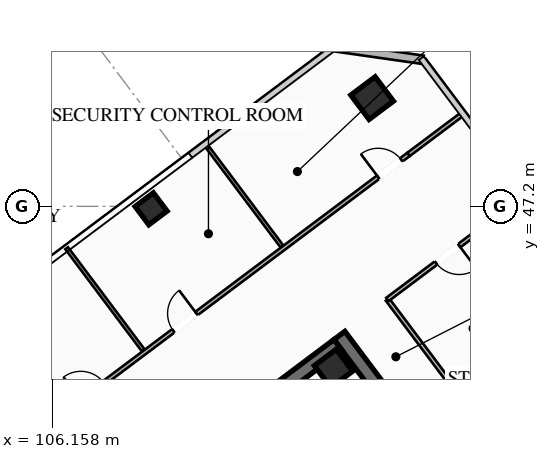
"""IFC4 building model, lengths in metres.
Left out: names, types, materials, properties, quantities, classifications, styles, units other than length and angle.
Written with IfcOpenShell. Run it as: python <this file> out.ifc"""

import sys

from ifc_helpers import new_model, si_unit, direction, frame, frame_2d, origin, origin_2d, place, context, subcontext, project, spatial, rectangle, hollow_rectangle, extrude, element, fill, save


model = new_model("IFC4")
c1 = context("Model", 3, precision=1e-05, world=origin(), true_north=direction((0.0, 1.0)))
c2 = subcontext(c1, "Body", "Model", "MODEL_VIEW")
j1 = project(units=[si_unit("LENGTHUNIT", "METRE"), si_unit("PLANEANGLEUNIT", "RADIAN")], contexts=[c1])
p1 = place(None, origin())
s1 = spatial("IfcSite", under=j1, at=p1, CompositionType="ELEMENT")
p2 = place(p1, origin())
s2 = spatial("IfcBuilding", under=s1, at=p2, CompositionType="ELEMENT")
p3 = place(p2, frame((0.0, 0.0, 221.95)))
s3 = spatial("IfcBuildingStorey", under=s2, at=p3, CompositionType="ELEMENT", Elevation=221.95)
p4 = place(p3, frame((115.604, 42.953, 0.0), z_axis=(0.0, 0.0, 1.0), x_axis=(0.600005007985, -0.799996243986, 0.0)))
e1 = element("IfcWall", 1, at=p4, inside=s3, PredefinedType="SHEAR", context=c2, shape_type="SweptSolid", body=[
    extrude(rectangle(XDim=15.6, YDim=0.45, at=frame_2d((7.8, 0.0))), origin(), (0.0, 0.0, 1.0), 3.55),
])
p5 = place(p3, frame((103.351, 33.482, 0.0), z_axis=(0.0, 0.0, 1.0), x_axis=(0.8, 0.6, 0.0)))
e2 = element("IfcWall", 2, at=p5, inside=s3, PredefinedType="SHEAR", context=c2, shape_type="SweptSolid", body=[
    extrude(rectangle(XDim=15.26, YDim=0.45, at=frame_2d((7.63, 0.0))), origin(), (0.0, 0.0, 1.0), 3.55),
])
p6 = place(p5, frame((4.68, 0.0, 0.0)))
e3 = element("IfcOpeningElement", 3, at=p6, cuts=e2, PredefinedType="OPENING", context=c2, shape_type="SweptSolid", body=[
    extrude(rectangle(XDim=1.25, YDim=2.25, at=frame_2d((0.625, 1.125))), frame((0.0, 0.235, 0.0), z_axis=(0.0, -1.0, 0.0), x_axis=(1.0, 0.0, 0.0)), (0.0, 0.0, 1.0), 0.47),
])
p7 = place(p5, frame((9.73, 0.0, 0.0)))
e4 = element("IfcOpeningElement", 4, at=p7, cuts=e2, PredefinedType="OPENING", context=c2, shape_type="SweptSolid", body=[
    extrude(rectangle(XDim=1.25, YDim=2.25, at=frame_2d((0.625, 1.125))), frame((0.0, 0.235, 0.0), z_axis=(0.0, -1.0, 0.0), x_axis=(1.0, 0.0, 0.0)), (0.0, 0.0, 1.0), 0.47),
])
p8 = place(p3, frame((115.41, 41.87, 0.0), z_axis=(0.0, 0.0, 1.0), x_axis=(0.799999996291, 0.600000004945, 0.0)))
e5 = element("IfcColumn", 5, at=p8, inside=s3, PredefinedType="COLUMN", context=c2, shape_type="SweptSolid", body=[
    extrude(hollow_rectangle(XDim=0.9, YDim=0.9, WallThickness=0.04, at=origin_2d()), origin(), (0.0, 0.0, 1.0), 3.37),
])
p9 = place(p3, frame((116.68, 50.76, 0.0), z_axis=(0.0, 0.0, 1.0), x_axis=(0.799999996291, 0.600000004945, 0.0)))
e6 = element("IfcColumn", 6, at=p9, inside=s3, PredefinedType="COLUMN", context=c2, shape_type="SweptSolid", body=[
    extrude(hollow_rectangle(XDim=1.0, YDim=1.0, WallThickness=0.04, at=origin_2d()), origin(), (0.0, 0.0, 1.0), 3.37),
])
p10 = place(p3, frame((109.41, 47.12, 0.0), z_axis=(0.0, 0.0, 1.0), x_axis=(0.799999996291, 0.600000004945, 0.0)))
e7 = element("IfcColumn", 7, at=p10, inside=s3, PredefinedType="COLUMN", context=c2, shape_type="SweptSolid", body=[
    extrude(hollow_rectangle(XDim=0.75, YDim=0.75, WallThickness=0.032, at=origin_2d()), origin(), (0.0, 0.0, 1.0), 3.37),
])
p11 = place(p3, frame((115.42, 52.44, 0.0), z_axis=(0.0, 0.0, 1.0), x_axis=(0.989954425158, -0.14138683146, 0.0)))
e8 = element("IfcWall", 8, at=p11, inside=s3, PredefinedType="SOLIDWALL", context=c2, shape_type="SweptSolid", body=[
    extrude(rectangle(XDim=2.97, YDim=0.28, at=frame_2d((1.485, 0.0))), origin(), (0.0, 0.0, 1.0), 3.37),
])
p12 = place(p3, frame((121.204, 41.528, 0.0), z_axis=(0.0, 0.0, 1.0), x_axis=(-0.800017232136, -0.599977023131, 0.0)))
e9 = element("IfcWall", 9, at=p12, inside=s3, PredefinedType="SHEAR", context=c2, shape_type="SweptSolid", body=[
    extrude(rectangle(XDim=3.4, YDim=0.2, at=frame_2d((1.7, 0.0))), origin(), (0.0, 0.0, 1.0), 3.37),
])
p13 = place(p12, frame((1.975, 0.0, 0.0)))
e10 = element("IfcOpeningElement", 10, at=p13, cuts=e9, PredefinedType="OPENING", context=c2, shape_type="SweptSolid", body=[
    extrude(rectangle(XDim=1.15, YDim=2.2, at=frame_2d((0.575, 1.1))), frame((0.0, 0.11, 0.0), z_axis=(0.0, -1.0, 0.0), x_axis=(1.0, 0.0, 0.0)), (0.0, 0.0, 1.0), 0.22),
])
p14 = place(p3, frame((119.824, 40.618, 0.0), z_axis=(0.0, 0.0, 1.0), x_axis=(-0.599982243973, 0.800013316712, 0.0)))
e11 = element("IfcWall", 11, at=p14, inside=s3, PredefinedType="PARTITIONING", context=c2, shape_type="SweptSolid", body=[
    extrude(rectangle(XDim=4.4, YDim=0.135, at=frame_2d((2.2, 0.0))), origin(), (0.0, 0.0, 1.0), 2.723),
])
p15 = place(p3, frame((98.696, 34.522, 0.0), z_axis=(0.0, 0.0, 1.0), x_axis=(0.799998778269, 0.600001628972, 0.0)))
e12 = element("IfcWall", 12, at=p15, inside=s3, PredefinedType="PARTITIONING", context=c2, shape_type="SweptSolid", body=[
    extrude(rectangle(XDim=23.98, YDim=0.135, at=frame_2d((11.99, 0.0))), origin(), (0.0, 0.0, 1.0), 2.723),
])
p16 = place(p15, frame((0.3, 0.0, 0.0)))
e13 = element("IfcOpeningElement", 13, at=p16, cuts=e12, PredefinedType="OPENING", context=c2, shape_type="SweptSolid", body=[
    extrude(rectangle(XDim=0.95, YDim=2.05, at=frame_2d((0.475, 1.025))), frame((0.0, 0.077, 0.0), z_axis=(0.0, -1.0, 0.0), x_axis=(1.0, 0.0, 0.0)), (0.0, 0.0, 1.0), 0.155),
])
p17 = place(p15, frame((10.503, 0.0, 0.0)))
e14 = element("IfcOpeningElement", 14, at=p17, cuts=e12, PredefinedType="OPENING", context=c2, shape_type="SweptSolid", body=[
    extrude(rectangle(XDim=0.95, YDim=2.05, at=frame_2d((0.475, 1.025))), frame((0.0, 0.077, 0.0), z_axis=(0.0, -1.0, 0.0), x_axis=(1.0, 0.0, 0.0)), (0.0, 0.0, 1.0), 0.155),
])
p18 = place(p15, frame((14.308, 0.0, 0.0)))
e15 = element("IfcOpeningElement", 15, at=p18, cuts=e12, PredefinedType="OPENING", context=c2, shape_type="SweptSolid", body=[
    extrude(rectangle(XDim=0.95, YDim=2.05, at=frame_2d((0.475, 1.025))), frame((0.0, 0.077, 0.0), z_axis=(0.0, -1.0, 0.0), x_axis=(1.0, 0.0, 0.0)), (0.0, 0.0, 1.0), 0.155),
])
p19 = place(p15, frame((22.73, 0.0, 0.0)))
e16 = element("IfcOpeningElement", 16, at=p19, cuts=e12, PredefinedType="OPENING", context=c2, shape_type="SweptSolid", body=[
    extrude(rectangle(XDim=0.95, YDim=2.05, at=frame_2d((0.475, 1.025))), frame((0.0, 0.077, 0.0), z_axis=(0.0, -1.0, 0.0), x_axis=(1.0, 0.0, 0.0)), (0.0, 0.0, 1.0), 0.155),
])
p20 = place(p3, frame((117.88, 48.91, 0.0), z_axis=(0.0, 0.0, 1.0), x_axis=(0.8, 0.6, 0.0)))
e17 = element("IfcWall", 17, at=p20, inside=s3, PredefinedType="PARTITIONING", context=c2, shape_type="SweptSolid", body=[
    extrude(rectangle(XDim=2.23, YDim=0.135, at=frame_2d((1.115, 0.0))), origin(), (0.0, 0.0, 1.0), 2.723),
])
for number, where, z_axis, x_axis in (
    (18, (109.152, 42.464, 0.0), (0.0, 0.0, 1.0), (-0.6, 0.8, 0.0)),
    (19, (113.712, 45.884, 0.0), (0.0, 0.0, 1.0), (-0.6, 0.8, 0.0)),
):
    element("IfcWall", number, at=place(p3, frame(where, z_axis=z_axis, x_axis=x_axis)), inside=s3, PredefinedType="PARTITIONING", context=c2, shape_type="SweptSolid", body=[
        extrude(rectangle(XDim=4.2, YDim=0.11, at=frame_2d((2.1, 0.0))), origin(), (0.0, 0.0, 1.0), 2.723),
    ])
p21 = place(p3, frame((121.704, 47.528, 0.0), z_axis=(0.0, 0.0, 1.0), x_axis=(-0.799989629485, -0.600013827105, 0.0)))
e20 = element("IfcWall", 20, at=p21, inside=s3, PredefinedType="PARTITIONING", context=c2, shape_type="SweptSolid", body=[
    extrude(rectangle(XDim=5.65, YDim=0.135, at=frame_2d((2.825, 0.0))), origin(), (0.0, 0.0, 1.0), 2.723),
])
p22 = place(p21, frame((2.7, 0.0, 0.0)))
e21 = element("IfcOpeningElement", 21, at=p22, cuts=e20, PredefinedType="OPENING", context=c2, shape_type="SweptSolid", body=[
    extrude(rectangle(XDim=0.95, YDim=2.05, at=frame_2d((0.475, 1.025))), frame((0.0, 0.077, 0.0), z_axis=(0.0, -1.0, 0.0), x_axis=(1.0, 0.0, 0.0)), (0.0, 0.0, 1.0), 0.155),
])
p23 = place(p18, origin())
e22 = element("IfcDoor", 22, at=p23, inside=s3, OperationType="SINGLE_SWING_RIGHT", PredefinedType="DOOR", context=c2, shape_type="SweptSolid", body=[
    extrude(rectangle(XDim=0.95, YDim=2.05, at=frame_2d((0.475, 1.025))), frame((0.0, 0.025, 0.0), z_axis=(0.0, -1.0, 0.0), x_axis=(1.0, 0.0, 0.0)), (0.0, 0.0, 1.0), 0.05),
])
fill(e15, e22)
p24 = place(p19, origin())
e23 = element("IfcDoor", 23, at=p24, inside=s3, OperationType="SINGLE_SWING_LEFT", PredefinedType="DOOR", context=c2, shape_type="SweptSolid", body=[
    extrude(rectangle(XDim=0.95, YDim=2.05, at=frame_2d((0.475, 1.025))), frame((0.0, 0.025, 0.0), z_axis=(0.0, -1.0, 0.0), x_axis=(1.0, 0.0, 0.0)), (0.0, 0.0, 1.0), 0.05),
])
fill(e16, e23)
p25 = place(p22, origin())
e24 = element("IfcDoor", 24, at=p25, inside=s3, OperationType="SINGLE_SWING_LEFT", PredefinedType="DOOR", context=c2, shape_type="SweptSolid", body=[
    extrude(rectangle(XDim=0.95, YDim=2.05, at=frame_2d((0.475, 1.025))), frame((0.0, 0.025, 0.0), z_axis=(0.0, -1.0, 0.0), x_axis=(1.0, 0.0, 0.0)), (0.0, 0.0, 1.0), 0.05),
])
fill(e21, e24)
save(model, sys.argv[1])
